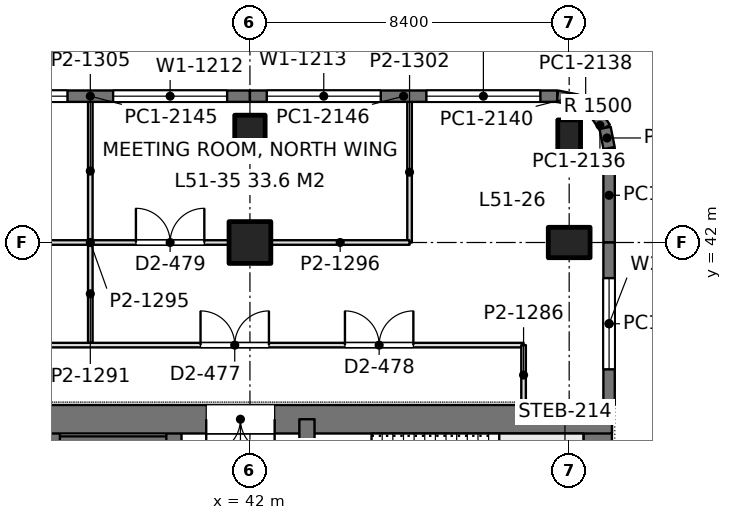
"""IFC4 building model, lengths in metres.
Left out: names, types, materials, properties, quantities, classifications, styles, units other than length and angle.
Written with IfcOpenShell. Run it as: python <this file> out.ifc"""

import sys

from ifc_helpers import new_model, si_unit, direction, frame, frame_2d, origin, origin_2d, place, context, subcontext, project, spatial, rectangle, extrude, element, fill, save


model = new_model("IFC4")
c1 = context("Model", 3, precision=1e-05, world=origin(), true_north=direction((0.0, 1.0)))
c2 = subcontext(c1, "Body", "Model", "MODEL_VIEW")
j1 = project(units=[si_unit("LENGTHUNIT", "METRE"), si_unit("PLANEANGLEUNIT", "RADIAN")], contexts=[c1])
p1 = place(None, origin())
s1 = spatial("IfcSite", under=j1, at=p1, CompositionType="ELEMENT")
p2 = place(p1, origin())
s2 = spatial("IfcBuilding", under=s1, at=p2, CompositionType="ELEMENT")
p3 = place(p2, frame((0.0, 0.0, 223.8)))
s3 = spatial("IfcBuildingStorey", under=s2, at=p3, CompositionType="ELEMENT", Elevation=223.8)
p4 = place(p3, frame((42.0, 42.0, 0.0), z_axis=(0.0, 0.0, 1.0), x_axis=(1.0, 0.0, 0.0)))
e1 = element("IfcColumn", 1, at=p4, inside=s3, PredefinedType="COLUMN", context=c2, shape_type="SweptSolid", body=[
    extrude(rectangle(XDim=1.1, YDim=1.1, at=origin_2d()), origin(), (0.0, 0.0, 1.0), 4.2),
])
for number, where, z_axis, x_axis in (
    (2, (42.0, 44.8, 0.0), (0.0, 0.0, 1.0), (1.0, 0.0, 0.0)),
    (3, (50.4, 42.0, 0.0), (0.0, 0.0, 1.0), (0.0, 1.0, 0.0)),
):
    element("IfcColumn", number, at=place(p3, frame(where, z_axis=z_axis, x_axis=x_axis)), inside=s3, PredefinedType="COLUMN", context=c2, shape_type="SweptSolid", body=[
        extrude(rectangle(XDim=0.8, YDim=1.1, at=origin_2d()), origin(), (0.0, 0.0, 1.0), 4.2),
    ])
p5 = place(p3, frame((50.4, 44.8, 0.0), z_axis=(0.0, 0.0, 1.0), x_axis=(1.0, 0.0, 0.0)))
e4 = element("IfcColumn", 4, at=p5, inside=s3, PredefinedType="COLUMN", context=c2, shape_type="SweptSolid", body=[
    extrude(rectangle(XDim=0.6, YDim=0.85, at=origin_2d()), origin(), (0.0, 0.0, 1.0), 4.2),
])
p6 = place(p3, frame((33.675, 37.35, 0.0), z_axis=(0.0, 0.0, 1.0), x_axis=(1.0, 0.0, 0.0)))
e5 = element("IfcWall", 5, at=p6, inside=s3, PredefinedType="SHEAR", context=c2, shape_type="SweptSolid", body=[
    extrude(rectangle(XDim=17.85, YDim=0.75, at=frame_2d((8.925, 0.0))), origin(), (0.0, 0.0, 1.0), 4.2),
])
p7 = place(p6, frame((7.175, 0.0, 0.0)))
e6 = element("IfcOpeningElement", 6, at=p7, cuts=e5, PredefinedType="OPENING", context=c2, shape_type="SweptSolid", body=[
    extrude(rectangle(XDim=1.8, YDim=2.4, at=frame_2d((0.9, 1.2))), frame((0.0, 0.385, 0.0), z_axis=(0.0, -1.0, 0.0), x_axis=(1.0, 0.0, 0.0)), (0.0, 0.0, 1.0), 0.77),
])
p8 = place(p3, frame((51.15, 13.05, 0.0), z_axis=(0.0, 0.0, 1.0), x_axis=(0.0, 1.0, 0.0)))
e7 = element("IfcWall", 7, at=p8, inside=s3, PredefinedType="SHEAR", context=c2, shape_type="SweptSolid", body=[
    extrude(rectangle(XDim=24.3, YDim=0.75, at=frame_2d((12.15, 0.0))), origin(), (0.0, 0.0, 1.0), 4.2),
])
p9 = place(p3, frame((43.5, 13.05, 0.0), z_axis=(0.0, 0.0, 1.0), x_axis=(0.0, 1.0, 0.0)))
e8 = element("IfcWall", 8, at=p9, inside=s3, PredefinedType="SHEAR", context=c2, shape_type="SweptSolid", body=[
    extrude(rectangle(XDim=24.3, YDim=0.4, at=frame_2d((12.15, 0.0))), origin(), (0.0, 0.0, 1.0), 4.2),
])
p10 = place(p9, frame((1.3, 0.0, 0.0)))
e9 = element("IfcOpeningElement", 9, at=p10, cuts=e8, PredefinedType="OPENING", context=c2, shape_type="SweptSolid", body=[
    extrude(rectangle(XDim=1.0, YDim=2.2, at=frame_2d((0.5, 1.1))), frame((0.0, 0.21, 0.0), z_axis=(0.0, -1.0, 0.0), x_axis=(1.0, 0.0, 0.0)), (0.0, 0.0, 1.0), 0.42),
])
p11 = place(p9, frame((22.0, 0.0, 0.0)))
e10 = element("IfcOpeningElement", 10, at=p11, cuts=e8, PredefinedType="OPENING", context=c2, shape_type="SweptSolid", body=[
    extrude(rectangle(XDim=1.0, YDim=2.2, at=frame_2d((0.5, 1.1))), frame((0.0, 0.21, 0.0), z_axis=(0.0, -1.0, 0.0), x_axis=(1.0, 0.0, 0.0)), (0.0, 0.0, 1.0), 0.42),
])
p12 = place(p9, frame((5.55, 0.0, 0.0)))
e11 = element("IfcOpeningElement", 11, at=p12, cuts=e8, PredefinedType="OPENING", context=c2, shape_type="SweptSolid", body=[
    extrude(rectangle(XDim=1.0, YDim=2.2, at=frame_2d((0.5, 1.1))), frame((0.0, 0.21, 0.0), z_axis=(0.0, -1.0, 0.0), x_axis=(1.0, 0.0, 0.0)), (0.0, 0.0, 1.0), 0.42),
])
p13 = place(p9, frame((9.55, 0.0, 0.0)))
e12 = element("IfcOpeningElement", 12, at=p13, cuts=e8, PredefinedType="OPENING", context=c2, shape_type="SweptSolid", body=[
    extrude(rectangle(XDim=1.0, YDim=2.2, at=frame_2d((0.5, 1.1))), frame((0.0, 0.21, 0.0), z_axis=(0.0, -1.0, 0.0), x_axis=(1.0, 0.0, 0.0)), (0.0, 0.0, 1.0), 0.42),
])
p14 = place(p9, frame((12.8, 0.0, 0.0)))
e13 = element("IfcOpeningElement", 13, at=p14, cuts=e8, PredefinedType="OPENING", context=c2, shape_type="SweptSolid", body=[
    extrude(rectangle(XDim=1.1, YDim=2.2, at=frame_2d((0.55, 1.1))), frame((0.0, 0.21, 0.0), z_axis=(0.0, -1.0, 0.0), x_axis=(1.0, 0.0, 0.0)), (0.0, 0.0, 1.0), 0.42),
])
p15 = place(p9, frame((15.538, 0.0, 0.0)))
e14 = element("IfcOpeningElement", 14, at=p15, cuts=e8, PredefinedType="OPENING", context=c2, shape_type="SweptSolid", body=[
    extrude(rectangle(XDim=1.1, YDim=2.2, at=frame_2d((0.55, 1.1))), frame((0.0, 0.21, 0.0), z_axis=(0.0, -1.0, 0.0), x_axis=(1.0, 0.0, 0.0)), (0.0, 0.0, 1.0), 0.42),
])
p16 = place(p9, frame((18.262, 0.0, 0.0)))
e15 = element("IfcOpeningElement", 15, at=p16, cuts=e8, PredefinedType="OPENING", context=c2, shape_type="SweptSolid", body=[
    extrude(rectangle(XDim=1.1, YDim=2.2, at=frame_2d((0.55, 1.1))), frame((0.0, 0.21, 0.0), z_axis=(0.0, -1.0, 0.0), x_axis=(1.0, 0.0, 0.0)), (0.0, 0.0, 1.0), 0.42),
])
p17 = place(p3, frame((40.0, 13.05, 0.0), z_axis=(0.0, 0.0, 1.0), x_axis=(0.0, 1.0, 0.0)))
e16 = element("IfcWall", 16, at=p17, inside=s3, PredefinedType="SHEAR", context=c2, shape_type="SweptSolid", body=[
    extrude(rectangle(XDim=24.3, YDim=0.4, at=frame_2d((12.15, 0.0))), origin(), (0.0, 0.0, 1.0), 4.2),
])
p18 = place(p17, frame((15.75, 0.0, 0.0)))
e17 = element("IfcOpeningElement", 17, at=p18, cuts=e16, PredefinedType="OPENING", context=c2, shape_type="SweptSolid", body=[
    extrude(rectangle(XDim=1.1, YDim=2.2, at=frame_2d((0.55, 1.1))), frame((0.0, 0.21, 0.0), z_axis=(0.0, -1.0, 0.0), x_axis=(1.0, 0.0, 0.0)), (0.0, 0.0, 1.0), 0.42),
])
p19 = place(p17, frame((18.6, 0.0, 0.0)))
e18 = element("IfcOpeningElement", 18, at=p19, cuts=e16, PredefinedType="OPENING", context=c2, shape_type="SweptSolid", body=[
    extrude(rectangle(XDim=1.1, YDim=2.2, at=frame_2d((0.55, 1.1))), frame((0.0, 0.21, 0.0), z_axis=(0.0, -1.0, 0.0), x_axis=(1.0, 0.0, 0.0)), (0.0, 0.0, 1.0), 0.42),
])
p20 = place(p17, frame((21.45, 0.0, 0.0)))
e19 = element("IfcOpeningElement", 19, at=p20, cuts=e16, PredefinedType="OPENING", context=c2, shape_type="SweptSolid", body=[
    extrude(rectangle(XDim=1.1, YDim=2.2, at=frame_2d((0.55, 1.1))), frame((0.0, 0.21, 0.0), z_axis=(0.0, -1.0, 0.0), x_axis=(1.0, 0.0, 0.0)), (0.0, 0.0, 1.0), 0.42),
])
p21 = place(p17, frame((6.05, 0.0, 0.0)))
e20 = element("IfcOpeningElement", 20, at=p21, cuts=e16, PredefinedType="OPENING", context=c2, shape_type="SweptSolid", body=[
    extrude(rectangle(XDim=1.8, YDim=2.4, at=frame_2d((0.9, 1.2))), frame((0.0, 0.21, 0.0), z_axis=(0.0, -1.0, 0.0), x_axis=(1.0, 0.0, 0.0)), (0.0, 0.0, 1.0), 0.42),
])
p22 = place(p17, frame((11.25, 0.0, 0.0)))
e21 = element("IfcOpeningElement", 21, at=p22, cuts=e16, PredefinedType="OPENING", context=c2, shape_type="SweptSolid", body=[
    extrude(rectangle(XDim=1.8, YDim=2.4, at=frame_2d((0.9, 1.2))), frame((0.0, 0.21, 0.0), z_axis=(0.0, -1.0, 0.0), x_axis=(1.0, 0.0, 0.0)), (0.0, 0.0, 1.0), 0.42),
])
p23 = place(p3, frame((36.8, 27.925, 0.0), z_axis=(0.0, 0.0, 1.0), x_axis=(0.0, 1.0, 0.0)))
e22 = element("IfcWall", 22, at=p23, inside=s3, PredefinedType="SHEAR", context=c2, shape_type="SweptSolid", body=[
    extrude(rectangle(XDim=9.425, YDim=0.4, at=frame_2d((4.712, 0.0))), origin(), (0.0, 0.0, 1.0), 4.2),
])
p24 = place(p3, frame((40.0, 36.625, 0.0), z_axis=(0.0, 0.0, 1.0), x_axis=(-1.0, 0.0, 0.0)))
e23 = element("IfcWall", 23, at=p24, inside=s3, PredefinedType="SHEAR", context=c2, shape_type="SweptSolid", body=[
    extrude(rectangle(XDim=3.2, YDim=0.55, at=frame_2d((1.6, 0.0))), origin(), (0.0, 0.0, 1.0), 4.2),
])
p25 = place(p3, frame((33.6, 45.85, 0.0), z_axis=(0.0, 0.0, 1.0), x_axis=(1.0, 0.0, 0.0)))
e24 = element("IfcWall", 24, at=p25, inside=s3, PredefinedType="SOLIDWALL", context=c2, shape_type="SweptSolid", body=[
    extrude(rectangle(XDim=8.4, YDim=0.3, at=frame_2d((4.2, 0.0))), origin(), (0.0, 0.0, 1.0), 4.05),
])
p26 = place(p25, frame((0.6, 0.0, 0.9)))
e25 = element("IfcOpeningElement", 25, at=p26, cuts=e24, PredefinedType="OPENING", context=c2, shape_type="SweptSolid", body=[
    extrude(rectangle(XDim=3.0, YDim=1.9, at=frame_2d((1.5, 0.95))), frame((0.0, 0.16, 0.0), z_axis=(0.0, -1.0, 0.0), x_axis=(1.0, 0.0, 0.0)), (0.0, 0.0, 1.0), 0.32),
])
p27 = place(p25, frame((4.8, 0.0, 0.9)))
e26 = element("IfcOpeningElement", 26, at=p27, cuts=e24, PredefinedType="OPENING", context=c2, shape_type="SweptSolid", body=[
    extrude(rectangle(XDim=3.0, YDim=1.9, at=frame_2d((1.5, 0.95))), frame((0.0, 0.16, 0.0), z_axis=(0.0, -1.0, 0.0), x_axis=(1.0, 0.0, 0.0)), (0.0, 0.0, 1.0), 0.32),
])
p28 = place(p3, frame((42.0, 45.85, 0.0), z_axis=(0.0, 0.0, 1.0), x_axis=(1.0, 0.0, 0.0)))
e27 = element("IfcWall", 27, at=p28, inside=s3, PredefinedType="SOLIDWALL", context=c2, shape_type="SweptSolid", body=[
    extrude(rectangle(XDim=8.085, YDim=0.3, at=frame_2d((4.042, 0.0))), origin(), (0.0, 0.0, 1.0), 4.05),
])
p29 = place(p28, frame((0.443, 0.0, 0.9)))
e28 = element("IfcOpeningElement", 28, at=p29, cuts=e27, PredefinedType="OPENING", context=c2, shape_type="SweptSolid", body=[
    extrude(rectangle(XDim=3.0, YDim=1.9, at=frame_2d((1.5, 0.95))), frame((0.0, 0.16, 0.0), z_axis=(0.0, -1.0, 0.0), x_axis=(1.0, 0.0, 0.0)), (0.0, 0.0, 1.0), 0.32),
])
p30 = place(p28, frame((4.643, 0.0, 0.9)))
e29 = element("IfcOpeningElement", 29, at=p30, cuts=e27, PredefinedType="OPENING", context=c2, shape_type="SweptSolid", body=[
    extrude(rectangle(XDim=3.0, YDim=1.9, at=frame_2d((1.5, 0.95))), frame((0.0, 0.16, 0.0), z_axis=(0.0, -1.0, 0.0), x_axis=(1.0, 0.0, 0.0)), (0.0, 0.0, 1.0), 0.32),
])
p31 = place(p3, frame((50.085, 45.85, 0.0), z_axis=(0.0, 0.0, 1.0), x_axis=(0.980702050465, -0.1955082817, 0.0)))
e30 = element("IfcWall", 30, at=p31, inside=s3, PredefinedType="SOLIDWALL", context=c2, shape_type="SweptSolid", body=[
    extrude(rectangle(XDim=0.541, YDim=0.3, at=frame_2d((0.271, 0.0))), origin(), (0.0, 0.0, 1.0), 4.05),
])
p32 = place(p3, frame((50.615, 45.744, 0.0), z_axis=(0.0, 0.0, 1.0), x_axis=(0.831692711774, -0.555236195849, 0.0)))
e31 = element("IfcWall", 31, at=p32, inside=s3, PredefinedType="SOLIDWALL", context=c2, shape_type="SweptSolid", body=[
    extrude(rectangle(XDim=0.525, YDim=0.3, at=frame_2d((0.263, 0.0))), origin(), (0.0, 0.0, 1.0), 4.05),
])
p33 = place(p3, frame((51.052, 45.453, 0.0), z_axis=(0.0, 0.0, 1.0), x_axis=(0.55534295404, -0.831621430339, 0.0)))
e32 = element("IfcWall", 32, at=p33, inside=s3, PredefinedType="SOLIDWALL", context=c2, shape_type="SweptSolid", body=[
    extrude(rectangle(XDim=0.526, YDim=0.3, at=frame_2d((0.263, 0.0))), origin(), (0.0, 0.0, 1.0), 4.05),
])
p34 = place(p3, frame((51.344, 45.015, 0.0), z_axis=(0.0, 0.0, 1.0), x_axis=(0.195073962632, -0.980788534345, 0.0)))
e33 = element("IfcWall", 33, at=p34, inside=s3, PredefinedType="SOLIDWALL", context=c2, shape_type="SweptSolid", body=[
    extrude(rectangle(XDim=0.541, YDim=0.3, at=frame_2d((0.271, 0.0))), origin(), (0.0, 0.0, 1.0), 4.05),
])
p35 = place(p3, frame((51.45, 44.485, 0.0), z_axis=(0.0, 0.0, 1.0), x_axis=(0.0, -1.0, 0.0)))
e34 = element("IfcWall", 34, at=p35, inside=s3, PredefinedType="SOLIDWALL", context=c2, shape_type="SweptSolid", body=[
    extrude(rectangle(XDim=2.485, YDim=0.3, at=frame_2d((1.243, 0.0))), origin(), (0.0, 0.0, 1.0), 4.05),
])
p36 = place(p3, frame((51.45, 42.0, 0.0), z_axis=(0.0, 0.0, 1.0), x_axis=(0.0, -1.0, 0.0)))
e35 = element("IfcWall", 35, at=p36, inside=s3, PredefinedType="SOLIDWALL", context=c2, shape_type="SweptSolid", body=[
    extrude(rectangle(XDim=4.275, YDim=0.3, at=frame_2d((2.137, 0.0))), origin(), (0.0, 0.0, 1.0), 4.05),
])
p37 = place(p36, frame((0.938, 0.0, 0.9)))
e36 = element("IfcOpeningElement", 36, at=p37, cuts=e35, PredefinedType="OPENING", context=c2, shape_type="SweptSolid", body=[
    extrude(rectangle(XDim=2.4, YDim=1.9, at=frame_2d((1.2, 0.95))), frame((0.0, 0.16, 0.0), z_axis=(0.0, -1.0, 0.0), x_axis=(1.0, 0.0, 0.0)), (0.0, 0.0, 1.0), 0.32),
])
p38 = place(p3, frame((34.149, 42.0, 0.0), z_axis=(0.0, 0.0, 1.0), x_axis=(1.0, 0.0, 0.0)))
e37 = element("IfcWall", 37, at=p38, inside=s3, PredefinedType="PARTITIONING", context=c2, shape_type="SweptSolid", body=[
    extrude(rectangle(XDim=7.302, YDim=0.12, at=frame_2d((3.651, 0.0))), origin(), (0.0, 0.0, 1.0), 3.55),
])
p39 = place(p38, frame((1.051, 0.0, 0.0)))
e38 = element("IfcOpeningElement", 38, at=p39, cuts=e37, PredefinedType="OPENING", context=c2, shape_type="SweptSolid", body=[
    extrude(rectangle(XDim=1.0, YDim=2.4, at=frame_2d((0.5, 1.2))), frame((0.0, 0.07, 0.0), z_axis=(0.0, -1.0, 0.0), x_axis=(1.0, 0.0, 0.0)), (0.0, 0.0, 1.0), 0.14),
])
p40 = place(p38, frame((4.851, 0.0, 0.0)))
e39 = element("IfcOpeningElement", 39, at=p40, cuts=e37, PredefinedType="OPENING", context=c2, shape_type="SweptSolid", body=[
    extrude(rectangle(XDim=1.8, YDim=2.2, at=frame_2d((0.9, 1.1))), frame((0.0, 0.07, 0.0), z_axis=(0.0, -1.0, 0.0), x_axis=(1.0, 0.0, 0.0)), (0.0, 0.0, 1.0), 0.14),
])
p41 = place(p3, frame((42.549, 42.0, 0.0), z_axis=(0.0, 0.0, 1.0), x_axis=(1.0, 0.0, 0.0)))
e40 = element("IfcWall", 40, at=p41, inside=s3, PredefinedType="PARTITIONING", context=c2, shape_type="SweptSolid", body=[
    extrude(rectangle(XDim=3.651, YDim=0.12, at=frame_2d((1.825, 0.0))), origin(), (0.0, 0.0, 1.0), 3.55),
])
p42 = place(p3, frame((37.8, 42.058, 0.0), z_axis=(0.0, 0.0, 1.0), x_axis=(0.0, 1.0, 0.0)))
e41 = element("IfcWall", 41, at=p42, inside=s3, PredefinedType="PARTITIONING", context=c2, shape_type="SweptSolid", body=[
    extrude(rectangle(XDim=3.644, YDim=0.12, at=frame_2d((1.822, 0.0))), origin(), (0.0, 0.0, 1.0), 3.55),
])
p43 = place(p3, frame((46.2, 42.0, 0.0), z_axis=(0.0, 0.0, 1.0), x_axis=(0.0, 1.0, 0.0)))
e42 = element("IfcWall", 42, at=p43, inside=s3, PredefinedType="PARTITIONING", context=c2, shape_type="SweptSolid", body=[
    extrude(rectangle(XDim=3.702, YDim=0.12, at=frame_2d((1.851, 0.0))), origin(), (0.0, 0.0, 1.0), 3.55),
])
p44 = place(p3, frame((37.8, 39.358, 0.0), z_axis=(0.0, 0.0, 1.0), x_axis=(0.0, 1.0, 0.0)))
e43 = element("IfcWall", 43, at=p44, inside=s3, PredefinedType="PARTITIONING", context=c2, shape_type="SweptSolid", body=[
    extrude(rectangle(XDim=2.584, YDim=0.12, at=frame_2d((1.292, 0.0))), origin(), (0.0, 0.0, 1.0), 3.55),
])
p45 = place(p3, frame((7.748, 39.3, 0.0), z_axis=(0.0, 0.0, 1.0), x_axis=(1.0, 0.0, 0.0)))
e44 = element("IfcWall", 44, at=p45, inside=s3, PredefinedType="PARTITIONING", context=c2, shape_type="SweptSolid", body=[
    extrude(rectangle(XDim=41.452, YDim=0.12, at=frame_2d((20.726, 0.0))), origin(), (0.0, 0.0, 1.0), 3.55),
])
p46 = place(p45, frame((1.527, 0.0, 0.0)))
e45 = element("IfcOpeningElement", 45, at=p46, cuts=e44, PredefinedType="OPENING", context=c2, shape_type="SweptSolid", body=[
    extrude(rectangle(XDim=1.8, YDim=2.2, at=frame_2d((0.9, 1.1))), frame((0.0, 0.07, 0.0), z_axis=(0.0, -1.0, 0.0), x_axis=(1.0, 0.0, 0.0)), (0.0, 0.0, 1.0), 0.14),
])
p47 = place(p45, frame((8.152, 0.0, 0.0)))
e46 = element("IfcOpeningElement", 46, at=p47, cuts=e44, PredefinedType="OPENING", context=c2, shape_type="SweptSolid", body=[
    extrude(rectangle(XDim=1.8, YDim=2.2, at=frame_2d((0.9, 1.1))), frame((0.0, 0.07, 0.0), z_axis=(0.0, -1.0, 0.0), x_axis=(1.0, 0.0, 0.0)), (0.0, 0.0, 1.0), 0.14),
])
p48 = place(p45, frame((12.352, 0.0, 0.0)))
e47 = element("IfcOpeningElement", 47, at=p48, cuts=e44, PredefinedType="OPENING", context=c2, shape_type="SweptSolid", body=[
    extrude(rectangle(XDim=1.8, YDim=2.2, at=frame_2d((0.9, 1.1))), frame((0.0, 0.07, 0.0), z_axis=(0.0, -1.0, 0.0), x_axis=(1.0, 0.0, 0.0)), (0.0, 0.0, 1.0), 0.14),
])
p49 = place(p45, frame((20.752, 0.0, 0.0)))
e48 = element("IfcOpeningElement", 48, at=p49, cuts=e44, PredefinedType="OPENING", context=c2, shape_type="SweptSolid", body=[
    extrude(rectangle(XDim=1.8, YDim=2.2, at=frame_2d((0.9, 1.1))), frame((0.0, 0.07, 0.0), z_axis=(0.0, -1.0, 0.0), x_axis=(1.0, 0.0, 0.0)), (0.0, 0.0, 1.0), 0.14),
])
p50 = place(p45, frame((24.952, 0.0, 0.0)))
e49 = element("IfcOpeningElement", 49, at=p50, cuts=e44, PredefinedType="OPENING", context=c2, shape_type="SweptSolid", body=[
    extrude(rectangle(XDim=1.8, YDim=2.2, at=frame_2d((0.9, 1.1))), frame((0.0, 0.07, 0.0), z_axis=(0.0, -1.0, 0.0), x_axis=(1.0, 0.0, 0.0)), (0.0, 0.0, 1.0), 0.14),
])
p51 = place(p45, frame((32.952, 0.0, 0.0)))
e50 = element("IfcOpeningElement", 50, at=p51, cuts=e44, PredefinedType="OPENING", context=c2, shape_type="SweptSolid", body=[
    extrude(rectangle(XDim=1.8, YDim=2.2, at=frame_2d((0.9, 1.1))), frame((0.0, 0.07, 0.0), z_axis=(0.0, -1.0, 0.0), x_axis=(1.0, 0.0, 0.0)), (0.0, 0.0, 1.0), 0.14),
])
p52 = place(p45, frame((36.752, 0.0, 0.0)))
e51 = element("IfcOpeningElement", 51, at=p52, cuts=e44, PredefinedType="OPENING", context=c2, shape_type="SweptSolid", body=[
    extrude(rectangle(XDim=1.8, YDim=2.2, at=frame_2d((0.9, 1.1))), frame((0.0, 0.07, 0.0), z_axis=(0.0, -1.0, 0.0), x_axis=(1.0, 0.0, 0.0)), (0.0, 0.0, 1.0), 0.14),
])
p53 = place(p3, frame((49.2, 37.724, 0.0), z_axis=(0.0, 0.0, 1.0), x_axis=(0.0, 1.0, 0.0)))
e52 = element("IfcWall", 52, at=p53, inside=s3, PredefinedType="PARTITIONING", context=c2, shape_type="SweptSolid", body=[
    extrude(rectangle(XDim=1.576, YDim=0.12, at=frame_2d((0.788, 0.0))), origin(), (0.0, 0.0, 1.0), 4.05),
])
p54 = place(p26, origin())
e53 = element("IfcWindow", 53, at=p54, inside=s3, PartitioningType="SINGLE_PANEL", PredefinedType="WINDOW", context=c2, shape_type="SweptSolid", body=[
    extrude(rectangle(XDim=3.0, YDim=1.9, at=frame_2d((1.5, 0.95))), frame((0.0, 0.03, 0.0), z_axis=(0.0, -1.0, 0.0), x_axis=(1.0, 0.0, 0.0)), (0.0, 0.0, 1.0), 0.06),
])
fill(e25, e53)
p55 = place(p27, origin())
e54 = element("IfcWindow", 54, at=p55, inside=s3, PartitioningType="SINGLE_PANEL", PredefinedType="WINDOW", context=c2, shape_type="SweptSolid", body=[
    extrude(rectangle(XDim=3.0, YDim=1.9, at=frame_2d((1.5, 0.95))), frame((0.0, 0.03, 0.0), z_axis=(0.0, -1.0, 0.0), x_axis=(1.0, 0.0, 0.0)), (0.0, 0.0, 1.0), 0.06),
])
fill(e26, e54)
p56 = place(p29, origin())
e55 = element("IfcWindow", 55, at=p56, inside=s3, PartitioningType="SINGLE_PANEL", PredefinedType="WINDOW", context=c2, shape_type="SweptSolid", body=[
    extrude(rectangle(XDim=3.0, YDim=1.9, at=frame_2d((1.5, 0.95))), frame((0.0, 0.03, 0.0), z_axis=(0.0, -1.0, 0.0), x_axis=(1.0, 0.0, 0.0)), (0.0, 0.0, 1.0), 0.06),
])
fill(e28, e55)
p57 = place(p30, origin())
e56 = element("IfcWindow", 56, at=p57, inside=s3, PartitioningType="SINGLE_PANEL", PredefinedType="WINDOW", context=c2, shape_type="SweptSolid", body=[
    extrude(rectangle(XDim=3.0, YDim=1.9, at=frame_2d((1.5, 0.95))), frame((0.0, 0.03, 0.0), z_axis=(0.0, -1.0, 0.0), x_axis=(1.0, 0.0, 0.0)), (0.0, 0.0, 1.0), 0.06),
])
fill(e29, e56)
p58 = place(p37, origin())
e57 = element("IfcWindow", 57, at=p58, inside=s3, PartitioningType="SINGLE_PANEL", PredefinedType="WINDOW", context=c2, shape_type="SweptSolid", body=[
    extrude(rectangle(XDim=2.4, YDim=1.9, at=frame_2d((1.2, 0.95))), frame((0.0, 0.03, 0.0), z_axis=(0.0, -1.0, 0.0), x_axis=(1.0, 0.0, 0.0)), (0.0, 0.0, 1.0), 0.06),
])
fill(e36, e57)
p59 = place(p7, frame((1.8, 0.0, 0.0), z_axis=(0.0, 0.0, 1.0), x_axis=(-1.0, 0.0, 0.0)))
e58 = element("IfcDoor", 58, at=p59, inside=s3, OperationType="DOUBLE_DOOR_SINGLE_SWING", PredefinedType="DOOR", context=c2, shape_type="SweptSolid", body=[
    extrude(rectangle(XDim=1.8, YDim=2.4, at=frame_2d((0.9, 1.2))), frame((0.0, 0.025, 0.0), z_axis=(0.0, -1.0, 0.0), x_axis=(1.0, 0.0, 0.0)), (0.0, 0.0, 1.0), 0.05),
])
fill(e6, e58)
p60 = place(p40, origin())
e59 = element("IfcDoor", 59, at=p60, inside=s3, OperationType="DOUBLE_DOOR_SINGLE_SWING", PredefinedType="DOOR", context=c2, shape_type="SweptSolid", body=[
    extrude(rectangle(XDim=1.8, YDim=2.2, at=frame_2d((0.9, 1.1))), frame((0.0, 0.025, 0.0), z_axis=(0.0, -1.0, 0.0), x_axis=(1.0, 0.0, 0.0)), (0.0, 0.0, 1.0), 0.05),
])
fill(e39, e59)
p61 = place(p51, origin())
e60 = element("IfcDoor", 60, at=p61, inside=s3, OperationType="DOUBLE_DOOR_SINGLE_SWING", PredefinedType="DOOR", context=c2, shape_type="SweptSolid", body=[
    extrude(rectangle(XDim=1.8, YDim=2.2, at=frame_2d((0.9, 1.1))), frame((0.0, 0.025, 0.0), z_axis=(0.0, -1.0, 0.0), x_axis=(1.0, 0.0, 0.0)), (0.0, 0.0, 1.0), 0.05),
])
fill(e50, e60)
p62 = place(p52, origin())
e61 = element("IfcDoor", 61, at=p62, inside=s3, OperationType="DOUBLE_DOOR_SINGLE_SWING", PredefinedType="DOOR", context=c2, shape_type="SweptSolid", body=[
    extrude(rectangle(XDim=1.8, YDim=2.2, at=frame_2d((0.9, 1.1))), frame((0.0, 0.025, 0.0), z_axis=(0.0, -1.0, 0.0), x_axis=(1.0, 0.0, 0.0)), (0.0, 0.0, 1.0), 0.05),
])
fill(e51, e61)
save(model, sys.argv[1])
